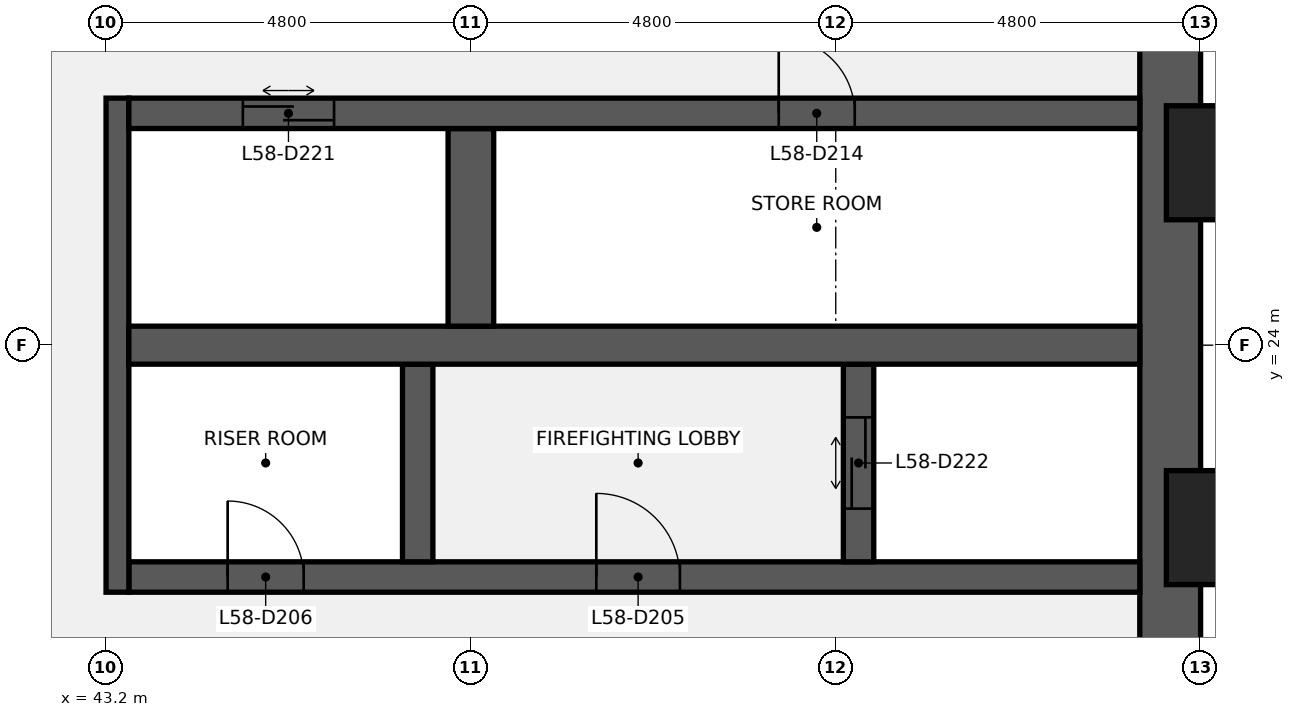
"""IFC4 building model, lengths in metres.
Left out: names, types, materials, properties, quantities, classifications, styles, units other than length and angle.
Written with IfcOpenShell. Run it as: python <this file> out.ifc"""

import sys

from ifc_helpers import new_model, si_unit, direction, frame, frame_2d, origin, origin_2d, place, context, subcontext, project, spatial, rectangle, extrude, element, fill, save


model = new_model("IFC4")
c1 = context("Model", 3, precision=1e-05, world=origin(), true_north=direction((0.0, 1.0)))
c2 = subcontext(c1, "Body", "Model", "MODEL_VIEW")
j1 = project(units=[si_unit("LENGTHUNIT", "METRE"), si_unit("PLANEANGLEUNIT", "RADIAN")], contexts=[c1])
p1 = place(None, origin())
s1 = spatial("IfcSite", under=j1, at=p1, CompositionType="ELEMENT")
p2 = place(p1, origin())
s2 = spatial("IfcBuilding", under=s1, at=p2, CompositionType="ELEMENT")
p3 = place(p2, frame((0.0, 0.0, 261.2)))
s3 = spatial("IfcBuildingStorey", under=s2, at=p3, CompositionType="ELEMENT", Elevation=261.2)
p4 = place(p3, frame((57.2, 38.4, 0.0), z_axis=(0.0, 0.0, 1.0), x_axis=(0.0, -1.0, 0.0)))
e1 = element("IfcWall", 1, at=p4, inside=s3, PredefinedType="SHEAR", context=c2, shape_type="SweptSolid", body=[
    extrude(rectangle(XDim=28.8, YDim=0.8, at=frame_2d((14.4, 0.0))), origin(), (0.0, 0.0, 1.0), 3.7),
])
p5 = place(p4, frame((18.45, 0.0, 0.9)))
e2 = element("IfcOpeningElement", 2, at=p5, cuts=e1, PredefinedType="OPENING", context=c2, shape_type="SweptSolid", body=[
    extrude(rectangle(XDim=1.5, YDim=1.5, at=frame_2d((0.75, 0.75))), frame((0.0, 0.41, 0.0), z_axis=(0.0, -1.0, 0.0), x_axis=(1.0, 0.0, 0.0)), (0.0, 0.0, 1.0), 0.82),
])
p6 = place(p4, frame((8.85, 0.0, 0.9)))
e3 = element("IfcOpeningElement", 3, at=p6, cuts=e1, PredefinedType="OPENING", context=c2, shape_type="SweptSolid", body=[
    extrude(rectangle(XDim=1.5, YDim=1.5, at=frame_2d((0.75, 0.75))), frame((0.0, 0.41, 0.0), z_axis=(0.0, -1.0, 0.0), x_axis=(1.0, 0.0, 0.0)), (0.0, 0.0, 1.0), 0.82),
])
p7 = place(p3, frame((43.5, 20.95, 0.0), z_axis=(0.0, 0.0, 1.0), x_axis=(1.0, 0.0, 0.0)))
e4 = element("IfcWall", 4, at=p7, inside=s3, PredefinedType="SHEAR", context=c2, shape_type="SweptSolid", body=[
    extrude(rectangle(XDim=13.3, YDim=0.4, at=frame_2d((6.65, 0.0))), origin(), (0.0, 0.0, 1.0), 3.7),
])
p8 = place(p7, frame((6.15, 0.0, 0.0)))
e5 = element("IfcOpeningElement", 5, at=p8, cuts=e4, PredefinedType="OPENING", context=c2, shape_type="SweptSolid", body=[
    extrude(rectangle(XDim=1.1, YDim=2.1, at=frame_2d((0.55, 1.05))), frame((0.0, 0.21, 0.0), z_axis=(0.0, -1.0, 0.0), x_axis=(1.0, 0.0, 0.0)), (0.0, 0.0, 1.0), 0.42),
])
p9 = place(p7, frame((1.3, 0.0, 0.0)))
e6 = element("IfcOpeningElement", 6, at=p9, cuts=e4, PredefinedType="OPENING", context=c2, shape_type="SweptSolid", body=[
    extrude(rectangle(XDim=1.0, YDim=2.1, at=frame_2d((0.5, 1.05))), frame((0.0, 0.21, 0.0), z_axis=(0.0, -1.0, 0.0), x_axis=(1.0, 0.0, 0.0)), (0.0, 0.0, 1.0), 0.42),
])
p10 = place(p3, frame((43.35, 20.75, 0.0), z_axis=(0.0, 0.0, 1.0), x_axis=(0.0, 1.0, 0.0)))
e7 = element("IfcWall", 7, at=p10, inside=s3, PredefinedType="SHEAR", context=c2, shape_type="SweptSolid", body=[
    extrude(rectangle(XDim=6.5, YDim=0.3, at=frame_2d((3.25, 0.0))), origin(), (0.0, 0.0, 1.0), 3.7),
])
p11 = place(p3, frame((53.1, 21.15, 0.0), z_axis=(0.0, 0.0, 1.0), x_axis=(0.0, 1.0, 0.0)))
e8 = element("IfcWall", 8, at=p11, inside=s3, PredefinedType="SHEAR", context=c2, shape_type="SweptSolid", body=[
    extrude(rectangle(XDim=2.6, YDim=0.4, at=frame_2d((1.3, 0.0))), origin(), (0.0, 0.0, 1.0), 3.7),
])
p12 = place(p11, frame((0.7, 0.0, 0.0)))
e9 = element("IfcOpeningElement", 9, at=p12, cuts=e8, PredefinedType="OPENING", context=c2, shape_type="SweptSolid", body=[
    extrude(rectangle(XDim=1.2, YDim=2.1, at=frame_2d((0.6, 1.05))), frame((0.0, 0.21, 0.0), z_axis=(0.0, -1.0, 0.0), x_axis=(1.0, 0.0, 0.0)), (0.0, 0.0, 1.0), 0.42),
])
p13 = place(p3, frame((47.3, 21.15, 0.0), z_axis=(0.0, 0.0, 1.0), x_axis=(0.0, 1.0, 0.0)))
e10 = element("IfcWall", 10, at=p13, inside=s3, PredefinedType="SHEAR", context=c2, shape_type="SweptSolid", body=[
    extrude(rectangle(XDim=2.6, YDim=0.4, at=frame_2d((1.3, 0.0))), origin(), (0.0, 0.0, 1.0), 3.7),
])
p14 = place(p3, frame((43.5, 24.0, 0.0), z_axis=(0.0, 0.0, 1.0), x_axis=(1.0, 0.0, 0.0)))
e11 = element("IfcWall", 11, at=p14, inside=s3, PredefinedType="SHEAR", context=c2, shape_type="SweptSolid", body=[
    extrude(rectangle(XDim=13.3, YDim=0.5, at=frame_2d((6.65, 0.0))), origin(), (0.0, 0.0, 1.0), 3.7),
])
p15 = place(p3, frame((48.0, 24.25, 0.0), z_axis=(0.0, 0.0, 1.0), x_axis=(0.0, 1.0, 0.0)))
e12 = element("IfcWall", 12, at=p15, inside=s3, PredefinedType="SHEAR", context=c2, shape_type="SweptSolid", body=[
    extrude(rectangle(XDim=2.6, YDim=0.6, at=frame_2d((1.3, 0.0))), origin(), (0.0, 0.0, 1.0), 3.7),
])
p16 = place(p3, frame((43.5, 27.05, 0.0), z_axis=(0.0, 0.0, 1.0), x_axis=(1.0, 0.0, 0.0)))
e13 = element("IfcWall", 13, at=p16, inside=s3, PredefinedType="SHEAR", context=c2, shape_type="SweptSolid", body=[
    extrude(rectangle(XDim=13.3, YDim=0.4, at=frame_2d((6.65, 0.0))), origin(), (0.0, 0.0, 1.0), 3.7),
])
p17 = place(p16, frame((8.55, 0.0, 0.0)))
e14 = element("IfcOpeningElement", 14, at=p17, cuts=e13, PredefinedType="OPENING", context=c2, shape_type="SweptSolid", body=[
    extrude(rectangle(XDim=1.0, YDim=2.1, at=frame_2d((0.5, 1.05))), frame((0.0, 0.21, 0.0), z_axis=(0.0, -1.0, 0.0), x_axis=(1.0, 0.0, 0.0)), (0.0, 0.0, 1.0), 0.42),
])
p18 = place(p16, frame((1.5, 0.0, 0.0)))
e15 = element("IfcOpeningElement", 15, at=p18, cuts=e13, PredefinedType="OPENING", context=c2, shape_type="SweptSolid", body=[
    extrude(rectangle(XDim=1.2, YDim=2.1, at=frame_2d((0.6, 1.05))), frame((0.0, 0.21, 0.0), z_axis=(0.0, -1.0, 0.0), x_axis=(1.0, 0.0, 0.0)), (0.0, 0.0, 1.0), 0.42),
])
for number, where, z_axis, x_axis in (
    (16, (58.35, 21.6, 0.0), (0.0, 0.0, 1.0), (0.0, 1.0, 0.0)),
    (17, (58.35, 26.4, 0.0), (0.0, 0.0, 1.0), (0.0, 1.0, 0.0)),
):
    element("IfcColumn", number, at=place(p3, frame(where, z_axis=z_axis, x_axis=x_axis)), inside=s3, PredefinedType="PILASTER", context=c2, shape_type="SweptSolid", body=[
        extrude(rectangle(XDim=2.4, YDim=1.5, at=origin_2d()), origin(), (0.0, 0.0, 1.0), 4.0),
    ])
p19 = place(p8, origin())
e18 = element("IfcDoor", 18, at=p19, inside=s3, OperationType="SINGLE_SWING_LEFT", PredefinedType="DOOR", context=c2, shape_type="SweptSolid", body=[
    extrude(rectangle(XDim=1.1, YDim=2.1, at=frame_2d((0.55, 1.05))), frame((0.0, 0.025, 0.0), z_axis=(0.0, -1.0, 0.0), x_axis=(1.0, 0.0, 0.0)), (0.0, 0.0, 1.0), 0.05),
])
fill(e5, e18)
p20 = place(p9, origin())
e19 = element("IfcDoor", 19, at=p20, inside=s3, OperationType="SINGLE_SWING_LEFT", PredefinedType="DOOR", context=c2, shape_type="SweptSolid", body=[
    extrude(rectangle(XDim=1.0, YDim=2.1, at=frame_2d((0.5, 1.05))), frame((0.0, 0.025, 0.0), z_axis=(0.0, -1.0, 0.0), x_axis=(1.0, 0.0, 0.0)), (0.0, 0.0, 1.0), 0.05),
])
fill(e6, e19)
p21 = place(p17, origin())
e20 = element("IfcDoor", 20, at=p21, inside=s3, OperationType="SINGLE_SWING_LEFT", PredefinedType="DOOR", context=c2, shape_type="SweptSolid", body=[
    extrude(rectangle(XDim=1.0, YDim=2.1, at=frame_2d((0.5, 1.05))), frame((0.0, 0.025, 0.0), z_axis=(0.0, -1.0, 0.0), x_axis=(1.0, 0.0, 0.0)), (0.0, 0.0, 1.0), 0.05),
])
fill(e14, e20)
p22 = place(p18, origin())
e21 = element("IfcDoor", 21, at=p22, inside=s3, OperationType="DOUBLE_DOOR_SLIDING", PredefinedType="DOOR", context=c2, shape_type="SweptSolid", body=[
    extrude(rectangle(XDim=1.2, YDim=2.1, at=frame_2d((0.6, 1.05))), frame((0.0, 0.025, 0.0), z_axis=(0.0, -1.0, 0.0), x_axis=(1.0, 0.0, 0.0)), (0.0, 0.0, 1.0), 0.05),
])
fill(e15, e21)
p23 = place(p12, origin())
e22 = element("IfcDoor", 22, at=p23, inside=s3, OperationType="DOUBLE_DOOR_SLIDING", PredefinedType="DOOR", context=c2, shape_type="SweptSolid", body=[
    extrude(rectangle(XDim=1.2, YDim=2.1, at=frame_2d((0.6, 1.05))), frame((0.0, 0.025, 0.0), z_axis=(0.0, -1.0, 0.0), x_axis=(1.0, 0.0, 0.0)), (0.0, 0.0, 1.0), 0.05),
])
fill(e9, e22)
save(model, sys.argv[1])
